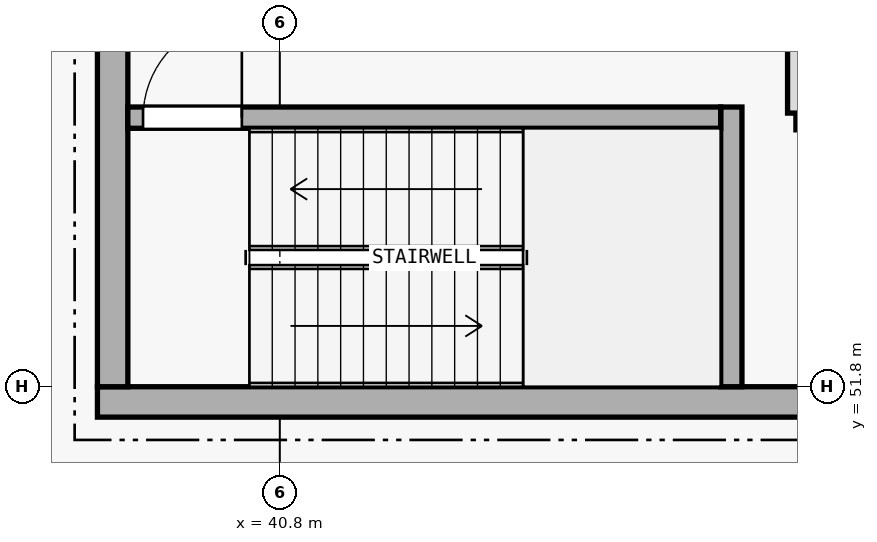
"""IFC4 building model, lengths in metres.
Left out: names, types, materials, properties, quantities, classifications, styles, units other than length and angle.
Written with IfcOpenShell. Run it as: python <this file> out.ifc"""

import sys

from ifc_helpers import new_model, si_unit, direction, frame, frame_2d, origin, place, context, subcontext, project, spatial, rectangle, extrude, element, fill, save


model = new_model("IFC4")
c1 = context("Model", 3, precision=1e-05, world=origin(), true_north=direction((0.0, 1.0)))
c2 = subcontext(c1, "Body", "Model", "MODEL_VIEW")
j1 = project(units=[si_unit("LENGTHUNIT", "METRE"), si_unit("PLANEANGLEUNIT", "RADIAN")], contexts=[c1])
p1 = place(None, origin())
s1 = spatial("IfcSite", under=j1, at=p1, CompositionType="ELEMENT")
p2 = place(p1, origin())
s2 = spatial("IfcBuilding", under=s1, at=p2, CompositionType="ELEMENT")
p3 = place(p2, frame((0.0, 0.0, 5.4)))
s3 = spatial("IfcBuildingStorey", under=s2, at=p3, CompositionType="ELEMENT", Elevation=5.4)
p4 = place(p3, frame((38.4, 51.6, 0.0), z_axis=(0.0, 0.0, 1.0), x_axis=(1.0, 0.0, 0.0)))
e1 = element("IfcWall", 1, at=p4, inside=s3, PredefinedType="SHEAR", context=c2, shape_type="SweptSolid", body=[
    extrude(rectangle(XDim=15.2, YDim=0.4, at=frame_2d((7.6, 0.0))), origin(), (0.0, 0.0, 1.0), 4.495),
])
p5 = place(p4, frame((10.25, 0.0, 0.0)))
e2 = element("IfcOpeningElement", 2, at=p5, cuts=e1, PredefinedType="OPENING", context=c2, shape_type="SweptSolid", body=[
    extrude(rectangle(XDim=1.3, YDim=2.2, at=frame_2d((0.65, 1.1))), frame((0.0, 0.21, 0.0), z_axis=(0.0, -1.0, 0.0), x_axis=(1.0, 0.0, 0.0)), (0.0, 0.0, 1.0), 0.42),
])
p6 = place(p3, frame((38.6, 51.8, 0.0), z_axis=(0.0, 0.0, 1.0), x_axis=(0.0, 1.0, 0.0)))
e3 = element("IfcWall", 3, at=p6, inside=s3, PredefinedType="SHEAR", context=c2, shape_type="SweptSolid", body=[
    extrude(rectangle(XDim=5.6, YDim=0.4, at=frame_2d((2.8, 0.0))), origin(), (0.0, 0.0, 1.0), 4.495),
])
p7 = place(p3, frame((46.74, 51.8, 0.0), z_axis=(0.0, 0.0, 1.0), x_axis=(0.0, 1.0, 0.0)))
e4 = element("IfcWall", 4, at=p7, inside=s3, PredefinedType="SHEAR", context=c2, shape_type="SweptSolid", body=[
    extrude(rectangle(XDim=3.68, YDim=0.28, at=frame_2d((1.84, 0.0))), origin(), (0.0, 0.0, 1.0), 4.495),
])
p8 = place(p3, frame((38.8, 55.34, 0.0), z_axis=(0.0, 0.0, 1.0), x_axis=(1.0, 0.0, 0.0)))
e5 = element("IfcWall", 5, at=p8, inside=s3, PredefinedType="SHEAR", context=c2, shape_type="SweptSolid", body=[
    extrude(rectangle(XDim=7.8, YDim=0.28, at=frame_2d((3.9, 0.0))), origin(), (0.0, 0.0, 1.0), 4.495),
])
p9 = place(p8, frame((0.2, 0.0, 0.0)))
e6 = element("IfcOpeningElement", 6, at=p9, cuts=e5, PredefinedType="OPENING", context=c2, shape_type="SweptSolid", body=[
    extrude(rectangle(XDim=1.3, YDim=2.2, at=frame_2d((0.65, 1.1))), frame((0.0, 0.15, 0.0), z_axis=(0.0, -1.0, 0.0), x_axis=(1.0, 0.0, 0.0)), (0.0, 0.0, 1.0), 0.3),
])
p10 = place(p3, frame((47.59, 55.29, 0.0), z_axis=(0.0, 0.0, 1.0), x_axis=(1.0, 0.0, 0.0)))
e7 = element("IfcWall", 7, at=p10, inside=s3, PredefinedType="PLUMBINGWALL", context=c2, shape_type="SweptSolid", body=[
    extrude(rectangle(XDim=1.62, YDim=0.22, at=frame_2d((0.81, 0.0))), origin(), (0.0, 0.0, 1.0), 4.2),
])
p11 = place(p10, frame((0.31, 0.0, 0.0)))
e8 = element("IfcOpeningElement", 8, at=p11, cuts=e7, PredefinedType="OPENING", context=c2, shape_type="SweptSolid", body=[
    extrude(rectangle(XDim=1.0, YDim=2.2, at=frame_2d((0.5, 1.1))), frame((0.0, 0.12, 0.0), z_axis=(0.0, -1.0, 0.0), x_axis=(1.0, 0.0, 0.0)), (0.0, 0.0, 1.0), 0.24),
])
p12 = place(p3, frame((47.59, 55.4, 0.0), z_axis=(0.0, 0.0, 1.0), x_axis=(0.0, 1.0, 0.0)))
e9 = element("IfcWall", 9, at=p12, inside=s3, PredefinedType="PLUMBINGWALL", context=c2, shape_type="SweptSolid", body=[
    extrude(rectangle(XDim=1.6, YDim=0.22, at=frame_2d((0.8, 0.0))), origin(), (0.0, 0.0, 1.0), 4.2),
])
p13 = place(p9, origin())
e10 = element("IfcDoor", 10, at=p13, inside=s3, OperationType="SINGLE_SWING_RIGHT", PredefinedType="DOOR", context=c2, shape_type="SweptSolid", body=[
    extrude(rectangle(XDim=1.3, YDim=2.2, at=frame_2d((0.65, 1.1))), frame((0.0, 0.025, 0.0), z_axis=(0.0, -1.0, 0.0), x_axis=(1.0, 0.0, 0.0)), (0.0, 0.0, 1.0), 0.05),
])
fill(e6, e10)
save(model, sys.argv[1])
